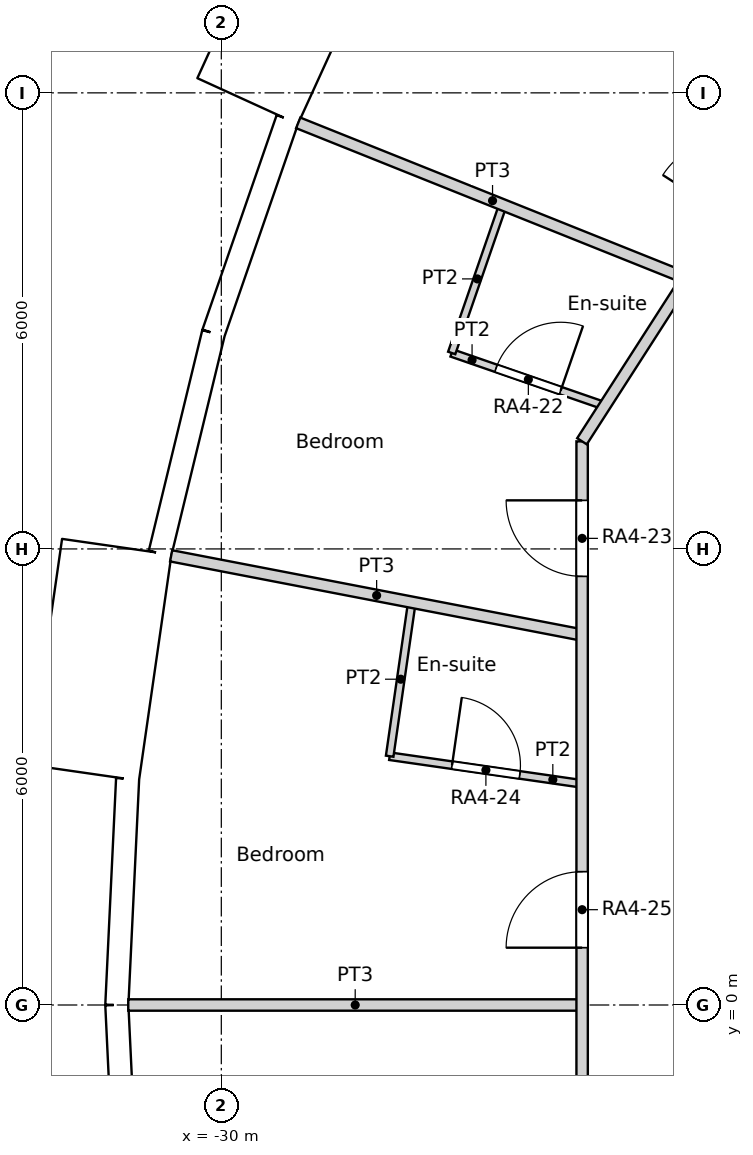
"""IFC4 building model, lengths in metres.
Left out: names, types, materials, properties, quantities, classifications, styles, units other than length and angle.
Written with IfcOpenShell. Run it as: python <this file> out.ifc"""

import sys

from ifc_helpers import new_model, si_unit, direction, frame, frame_2d, origin, origin_2d, place, context, subcontext, project, spatial, rectangle, circle, extrude, element, fill, save


model = new_model("IFC4")
c1 = context("Model", 3, precision=1e-05, world=origin(), true_north=direction((0.0, 1.0)))
c2 = subcontext(c1, "Body", "Model", "MODEL_VIEW")
j1 = project(units=[si_unit("LENGTHUNIT", "METRE"), si_unit("PLANEANGLEUNIT", "RADIAN")], contexts=[c1])
p1 = place(None, origin())
s1 = spatial("IfcSite", under=j1, at=p1, CompositionType="ELEMENT")
p2 = place(p1, origin())
s2 = spatial("IfcBuilding", under=s1, at=p2, CompositionType="ELEMENT")
p3 = place(p2, frame((0.0, 0.0, 60.6)))
s3 = spatial("IfcBuildingStorey", under=s2, at=p3, CompositionType="ELEMENT", Elevation=60.6)
for number, where, z_axis, x_axis in (
    (1, (-29.048, 8.529, 0.0), (0.0, 0.0, 1.0), (1.0, 0.0, 0.0)),
    (2, (-30.137, 2.878, 0.0), (0.0, 0.0, 1.0), (1.0, 0.0, 0.0)),
):
    element("IfcColumn", number, at=place(p3, frame(where, z_axis=z_axis, x_axis=x_axis)), inside=s3, PredefinedType="COLUMN", context=c2, shape_type="SweptSolid", body=[
        extrude(circle(Radius=0.7, at=origin_2d()), origin(), (0.0, 0.0, 1.0), 3.6),
    ])
p4 = place(p3, frame((-24.382, 2.85, 0.0), z_axis=(0.0, 0.0, 1.0), x_axis=(1.0, 0.0, 0.0)))
e3 = element("IfcColumn", 3, at=p4, inside=s3, PredefinedType="COLUMN", context=c2, shape_type="SweptSolid", body=[
    extrude(circle(Radius=0.75, at=origin_2d()), origin(), (0.0, 0.0, 1.0), 3.6),
])
p5 = place(p3, frame((-28.407, 14.622, -0.45), z_axis=(0.0, 0.0, 1.0), x_axis=(-0.415427028395, -0.909626508012, 0.0)))
e4 = element("IfcWall", 4, at=p5, inside=s3, PredefinedType="ELEMENTEDWALL", context=c2, shape_type="SweptSolid", body=[
    extrude(rectangle(XDim=3.0, YDim=1.45, at=frame_2d((1.5, 0.0))), origin(), (0.0, 0.0, 1.0), 3.6),
])
p6 = place(p5, frame((1.5, 0.0, 2.0)))
e5 = element("IfcOpeningElement", 5, at=p6, cuts=e4, PredefinedType="OPENING", context=c2, shape_type="SweptSolid", body=[
    extrude(circle(Radius=0.9, at=origin_2d()), frame((0.0, 0.735, 0.0), z_axis=(0.0, -1.0, 0.0), x_axis=(1.0, 0.0, 0.0)), (0.0, 0.0, 1.0), 1.47),
])
p7 = place(p3, frame((-29.129, 11.655, 0.0), z_axis=(0.0, 0.0, 1.0), x_axis=(-0.327071167136, -0.944999709856, 0.0)))
e6 = element("IfcWall", 6, at=p7, inside=s3, PredefinedType="SOLIDWALL", context=c2, shape_type="SweptSolid", body=[
    extrude(rectangle(XDim=2.98, YDim=0.3, at=frame_2d((1.49, 0.0))), origin(), (0.0, 0.0, 1.0), 2.65),
])
p8 = place(p7, frame((1.49, 0.0, 1.55)))
e7 = element("IfcOpeningElement", 7, at=p8, cuts=e6, PredefinedType="OPENING", context=c2, shape_type="SweptSolid", body=[
    extrude(circle(Radius=0.9, at=origin_2d()), frame((0.0, 0.16, 0.0), z_axis=(0.0, -1.0, 0.0), x_axis=(1.0, 0.0, 0.0)), (0.0, 0.0, 1.0), 0.32),
])
p9 = place(p3, frame((-30.104, 8.839, 0.0), z_axis=(0.0, 0.0, 1.0), x_axis=(-0.235743081534, -0.971815414319, 0.0)))
e8 = element("IfcWall", 8, at=p9, inside=s3, PredefinedType="SOLIDWALL", context=c2, shape_type="SweptSolid", body=[
    extrude(rectangle(XDim=2.979, YDim=0.3, at=frame_2d((1.49, 0.0))), origin(), (0.0, 0.0, 1.0), 3.15),
])
p10 = place(p9, frame((1.49, 0.0, 1.55)))
e9 = element("IfcOpeningElement", 9, at=p10, cuts=e8, PredefinedType="OPENING", context=c2, shape_type="SweptSolid", body=[
    extrude(circle(Radius=0.9, at=origin_2d()), frame((0.0, 0.16, 0.0), z_axis=(0.0, -1.0, 0.0), x_axis=(1.0, 0.0, 0.0)), (0.0, 0.0, 1.0), 0.32),
])
p11 = place(p3, frame((-31.375, 6.027, -0.45), z_axis=(0.0, 0.0, 1.0), x_axis=(-0.142332746704, -0.989818866872, 0.0)))
e10 = element("IfcWall", 10, at=p11, inside=s3, PredefinedType="ELEMENTEDWALL", context=c2, shape_type="SweptSolid", body=[
    extrude(rectangle(XDim=3.0, YDim=1.45, at=frame_2d((1.5, 0.0))), origin(), (0.0, 0.0, 1.0), 3.6),
])
p12 = place(p11, frame((1.5, 0.0, 2.0)))
e11 = element("IfcOpeningElement", 11, at=p12, cuts=e10, PredefinedType="OPENING", context=c2, shape_type="SweptSolid", body=[
    extrude(circle(Radius=0.9, at=origin_2d()), frame((0.0, 0.735, 0.0), z_axis=(0.0, -1.0, 0.0), x_axis=(1.0, 0.0, 0.0)), (0.0, 0.0, 1.0), 1.47),
])
p13 = place(p3, frame((-31.233, 2.976, 0.0), z_axis=(0.0, 0.0, 1.0), x_axis=(-0.047604077644, -0.998866283239, 0.0)))
e12 = element("IfcWall", 12, at=p13, inside=s3, PredefinedType="SOLIDWALL", context=c2, shape_type="SweptSolid", body=[
    extrude(rectangle(XDim=2.98, YDim=0.3, at=frame_2d((1.49, 0.0))), origin(), (0.0, 0.0, 1.0), 2.65),
])
p14 = place(p13, frame((1.49, 0.0, 1.55)))
e13 = element("IfcOpeningElement", 13, at=p14, cuts=e12, PredefinedType="OPENING", context=c2, shape_type="SweptSolid", body=[
    extrude(circle(Radius=0.9, at=origin_2d()), frame((0.0, 0.16, 0.0), z_axis=(0.0, -1.0, 0.0), x_axis=(1.0, 0.0, 0.0)), (0.0, 0.0, 1.0), 0.32),
])
p15 = place(p3, frame((-31.375, 0.0, 0.0), z_axis=(0.0, 0.0, 1.0), x_axis=(0.047604077644, -0.998866283239, 0.0)))
e14 = element("IfcWall", 14, at=p15, inside=s3, PredefinedType="SOLIDWALL", context=c2, shape_type="SweptSolid", body=[
    extrude(rectangle(XDim=2.98, YDim=0.3, at=frame_2d((1.49, 0.0))), origin(), (0.0, 0.0, 1.0), 3.15),
])
p16 = place(p15, frame((1.49, 0.0, 1.55)))
e15 = element("IfcOpeningElement", 15, at=p16, cuts=e14, PredefinedType="OPENING", context=c2, shape_type="SweptSolid", body=[
    extrude(circle(Radius=0.9, at=origin_2d()), frame((0.0, 0.16, 0.0), z_axis=(0.0, -1.0, 0.0), x_axis=(1.0, 0.0, 0.0)), (0.0, 0.0, 1.0), 0.32),
])
p17 = place(p3, frame((-25.255, 7.416, 0.0), z_axis=(0.0, 0.0, 1.0), x_axis=(0.540805851332, 0.841147449123, 0.0)))
e16 = element("IfcWall", 16, at=p17, inside=s3, PredefinedType="PARTITIONING", context=c2, shape_type="SweptSolid", body=[
    extrude(rectangle(XDim=14.829, YDim=0.15, at=frame_2d((7.415, 0.0))), origin(), (0.0, 0.0, 1.0), 3.15),
])
p18 = place(p17, frame((10.307, 0.0, 0.0)))
e17 = element("IfcOpeningElement", 17, at=p18, cuts=e16, PredefinedType="OPENING", context=c2, shape_type="SweptSolid", body=[
    extrude(rectangle(XDim=1.0, YDim=2.1, at=frame_2d((0.5, 1.05))), frame((0.0, 0.075, 0.0), z_axis=(0.0, -1.0, 0.0), x_axis=(1.0, 0.0, 0.0)), (0.0, 0.0, 1.0), 0.15),
])
p19 = place(p17, frame((3.522, 0.0, 0.0)))
e18 = element("IfcOpeningElement", 18, at=p19, cuts=e16, PredefinedType="OPENING", context=c2, shape_type="SweptSolid", body=[
    extrude(rectangle(XDim=1.0, YDim=2.1, at=frame_2d((0.5, 1.05))), frame((0.0, 0.075, 0.0), z_axis=(0.0, -1.0, 0.0), x_axis=(1.0, 0.0, 0.0)), (0.0, 0.0, 1.0), 0.15),
])
p20 = place(p3, frame((-25.253, -7.415, 0.0), z_axis=(0.0, 0.0, 1.0), x_axis=(0.0, 1.0, 0.0)))
e19 = element("IfcWall", 19, at=p20, inside=s3, PredefinedType="PARTITIONING", context=c2, shape_type="SweptSolid", body=[
    extrude(rectangle(XDim=14.83, YDim=0.15, at=frame_2d((7.415, 0.0))), origin(), (0.0, 0.0, 1.0), 3.15),
])
p21 = place(p20, frame((13.054, 0.0, 0.0)))
e20 = element("IfcOpeningElement", 20, at=p21, cuts=e19, PredefinedType="OPENING", context=c2, shape_type="SweptSolid", body=[
    extrude(rectangle(XDim=1.0, YDim=2.1, at=frame_2d((0.5, 1.05))), frame((0.0, 0.075, 0.0), z_axis=(0.0, -1.0, 0.0), x_axis=(1.0, 0.0, 0.0)), (0.0, 0.0, 1.0), 0.15),
])
p22 = place(p20, frame((8.169, 0.0, 0.0)))
e21 = element("IfcOpeningElement", 21, at=p22, cuts=e19, PredefinedType="OPENING", context=c2, shape_type="SweptSolid", body=[
    extrude(rectangle(XDim=1.0, YDim=2.1, at=frame_2d((0.5, 1.05))), frame((0.0, 0.075, 0.0), z_axis=(0.0, -1.0, 0.0), x_axis=(1.0, 0.0, 0.0)), (0.0, 0.0, 1.0), 0.15),
])
p23 = place(p20, frame((2.459, 0.0, 0.0)))
e22 = element("IfcOpeningElement", 22, at=p23, cuts=e19, PredefinedType="OPENING", context=c2, shape_type="SweptSolid", body=[
    extrude(rectangle(XDim=1.0, YDim=2.04, at=frame_2d((0.5, 1.02))), frame((0.0, 0.075, 0.0), z_axis=(0.0, -1.0, 0.0), x_axis=(1.0, 0.0, 0.0)), (0.0, 0.0, 1.0), 0.15),
])
p24 = place(p3, frame((-24.314, 13.213, 0.0), z_axis=(0.0, 0.0, 1.0), x_axis=(0.866007195875, -0.500031535699, 0.0)))
e23 = element("IfcWall", 23, at=p24, inside=s3, PredefinedType="PARTITIONING", context=c2, shape_type="SweptSolid", body=[
    extrude(rectangle(XDim=2.347, YDim=0.1, at=frame_2d((1.174, 0.0))), origin(), (0.0, 0.0, 1.0), 3.15),
])
p25 = place(p24, frame((0.724, 0.0, 0.0)))
e24 = element("IfcOpeningElement", 24, at=p25, cuts=e23, PredefinedType="OPENING", context=c2, shape_type="SweptSolid", body=[
    extrude(rectangle(XDim=0.9, YDim=2.04, at=frame_2d((0.45, 1.02))), frame((0.0, 0.05, 0.0), z_axis=(0.0, -1.0, 0.0), x_axis=(1.0, 0.0, 0.0)), (0.0, 0.0, 1.0), 0.1),
])
p26 = place(p3, frame((-28.988, 11.605, 0.0), z_axis=(0.0, 0.0, 1.0), x_axis=(0.928335994683, -0.371742223828, 0.0)))
e25 = element("IfcWall", 25, at=p26, inside=s3, PredefinedType="PARTITIONING", context=c2, shape_type="SweptSolid", body=[
    extrude(rectangle(XDim=5.508, YDim=0.15, at=frame_2d((2.754, 0.0))), origin(), (0.0, 0.0, 1.0), 3.15),
])
p27 = place(p3, frame((-26.969, 8.578, 0.0), z_axis=(0.0, 0.0, 1.0), x_axis=(0.326825955114, 0.945084543871, 0.0)))
e26 = element("IfcWall", 26, at=p27, inside=s3, PredefinedType="PARTITIONING", context=c2, shape_type="SweptSolid", body=[
    extrude(rectangle(XDim=2.062, YDim=0.1, at=frame_2d((1.031, 0.0))), origin(), (0.0, 0.0, 1.0), 3.15),
])
p28 = place(p3, frame((-26.969, 8.578, 0.0), z_axis=(0.0, 0.0, 1.0), x_axis=(0.945146525342, -0.326646667877, 0.0)))
e27 = element("IfcWall", 27, at=p28, inside=s3, PredefinedType="PARTITIONING", context=c2, shape_type="SweptSolid", body=[
    extrude(rectangle(XDim=2.133, YDim=0.1, at=frame_2d((1.066, 0.0))), origin(), (0.0, 0.0, 1.0), 3.15),
])
p29 = place(p28, frame((0.617, 0.0, 0.0)))
e28 = element("IfcOpeningElement", 28, at=p29, cuts=e27, PredefinedType="OPENING", context=c2, shape_type="SweptSolid", body=[
    extrude(rectangle(XDim=0.9, YDim=2.04, at=frame_2d((0.45, 1.02))), frame((0.0, 0.05, 0.0), z_axis=(0.0, -1.0, 0.0), x_axis=(1.0, 0.0, 0.0)), (0.0, 0.0, 1.0), 0.1),
])
p30 = place(p3, frame((-30.66, 5.909, 0.0), z_axis=(0.0, 0.0, 1.0), x_axis=(0.981940925451, -0.189187787461, 0.0)))
e29 = element("IfcWall", 29, at=p30, inside=s3, PredefinedType="PARTITIONING", context=c2, shape_type="SweptSolid", body=[
    extrude(rectangle(XDim=5.506, YDim=0.15, at=frame_2d((2.753, 0.0))), origin(), (0.0, 0.0, 1.0), 3.15),
])
p31 = place(p3, frame((-27.785, 3.273, 0.0), z_axis=(0.0, 0.0, 1.0), x_axis=(0.142640130423, 0.989774617372, 0.0)))
e30 = element("IfcWall", 30, at=p31, inside=s3, PredefinedType="PARTITIONING", context=c2, shape_type="SweptSolid", body=[
    extrude(rectangle(XDim=2.047, YDim=0.1, at=frame_2d((1.023, 0.0))), origin(), (0.0, 0.0, 1.0), 3.15),
])
p32 = place(p3, frame((-27.785, 3.273, 0.0), z_axis=(0.0, 0.0, 1.0), x_axis=(0.989823118164, -0.142303178978, 0.0)))
e31 = element("IfcWall", 31, at=p32, inside=s3, PredefinedType="PARTITIONING", context=c2, shape_type="SweptSolid", body=[
    extrude(rectangle(XDim=2.558, YDim=0.1, at=frame_2d((1.279, 0.0))), origin(), (0.0, 0.0, 1.0), 3.15),
])
p33 = place(p32, frame((0.829, 0.0, 0.0)))
e32 = element("IfcOpeningElement", 32, at=p33, cuts=e31, PredefinedType="OPENING", context=c2, shape_type="SweptSolid", body=[
    extrude(rectangle(XDim=0.9, YDim=2.04, at=frame_2d((0.45, 1.02))), frame((0.0, 0.05, 0.0), z_axis=(0.0, -1.0, 0.0), x_axis=(1.0, 0.0, 0.0)), (0.0, 0.0, 1.0), 0.1),
])
p34 = place(p3, frame((-31.224, 0.0, 0.0), z_axis=(0.0, 0.0, 1.0), x_axis=(1.0, 0.0, 0.0)))
e33 = element("IfcWall", 33, at=p34, inside=s3, PredefinedType="PARTITIONING", context=c2, shape_type="SweptSolid", body=[
    extrude(rectangle(XDim=5.971, YDim=0.15, at=frame_2d((2.986, 0.0))), origin(), (0.0, 0.0, 1.0), 3.15),
])
p35 = place(p6, origin())
e34 = element("IfcWindow", 34, at=p35, inside=s3, PartitioningType="SINGLE_PANEL", PredefinedType="WINDOW", context=c2, shape_type="SweptSolid", body=[
    extrude(circle(Radius=0.9, at=origin_2d()), frame((0.0, 0.695, 0.0), z_axis=(0.0, -1.0, 0.0), x_axis=(1.0, 0.0, 0.0)), (0.0, 0.0, 1.0), 0.1),
])
fill(e5, e34)
p36 = place(p8, origin())
e35 = element("IfcWindow", 35, at=p36, inside=s3, PartitioningType="SINGLE_PANEL", PredefinedType="WINDOW", context=c2, shape_type="SweptSolid", body=[
    extrude(circle(Radius=0.9, at=origin_2d()), frame((0.0, 0.12, 0.0), z_axis=(0.0, -1.0, 0.0), x_axis=(1.0, 0.0, 0.0)), (0.0, 0.0, 1.0), 0.1),
])
fill(e7, e35)
p37 = place(p10, origin())
e36 = element("IfcWindow", 36, at=p37, inside=s3, PartitioningType="SINGLE_PANEL", PredefinedType="WINDOW", context=c2, shape_type="SweptSolid", body=[
    extrude(circle(Radius=0.9, at=origin_2d()), frame((0.0, 0.12, 0.0), z_axis=(0.0, -1.0, 0.0), x_axis=(1.0, 0.0, 0.0)), (0.0, 0.0, 1.0), 0.1),
])
fill(e9, e36)
p38 = place(p12, origin())
e37 = element("IfcWindow", 37, at=p38, inside=s3, PartitioningType="SINGLE_PANEL", PredefinedType="WINDOW", context=c2, shape_type="SweptSolid", body=[
    extrude(circle(Radius=0.9, at=origin_2d()), frame((0.0, 0.695, 0.0), z_axis=(0.0, -1.0, 0.0), x_axis=(1.0, 0.0, 0.0)), (0.0, 0.0, 1.0), 0.1),
])
fill(e11, e37)
p39 = place(p14, origin())
e38 = element("IfcWindow", 38, at=p39, inside=s3, PartitioningType="SINGLE_PANEL", PredefinedType="WINDOW", context=c2, shape_type="SweptSolid", body=[
    extrude(circle(Radius=0.9, at=origin_2d()), frame((0.0, 0.12, 0.0), z_axis=(0.0, -1.0, 0.0), x_axis=(1.0, 0.0, 0.0)), (0.0, 0.0, 1.0), 0.1),
])
fill(e13, e38)
p40 = place(p16, origin())
e39 = element("IfcWindow", 39, at=p40, inside=s3, PartitioningType="SINGLE_PANEL", PredefinedType="WINDOW", context=c2, shape_type="SweptSolid", body=[
    extrude(circle(Radius=0.9, at=origin_2d()), frame((0.0, 0.12, 0.0), z_axis=(0.0, -1.0, 0.0), x_axis=(1.0, 0.0, 0.0)), (0.0, 0.0, 1.0), 0.1),
])
fill(e15, e39)
p41 = place(p29, origin())
e40 = element("IfcDoor", 40, at=p41, inside=s3, OperationType="SINGLE_SWING_RIGHT", PredefinedType="DOOR", context=c2, shape_type="SweptSolid", body=[
    extrude(rectangle(XDim=0.9, YDim=2.04, at=frame_2d((0.45, 1.02))), frame((0.0, 0.025, 0.0), z_axis=(0.0, -1.0, 0.0), x_axis=(1.0, 0.0, 0.0)), (0.0, 0.0, 1.0), 0.05),
])
fill(e28, e40)
p42 = place(p21, origin())
e41 = element("IfcDoor", 41, at=p42, inside=s3, OperationType="SINGLE_SWING_RIGHT", PredefinedType="DOOR", context=c2, shape_type="SweptSolid", body=[
    extrude(rectangle(XDim=1.0, YDim=2.1, at=frame_2d((0.5, 1.05))), frame((0.0, 0.025, 0.0), z_axis=(0.0, -1.0, 0.0), x_axis=(1.0, 0.0, 0.0)), (0.0, 0.0, 1.0), 0.05),
])
fill(e20, e41)
p43 = place(p33, origin())
e42 = element("IfcDoor", 42, at=p43, inside=s3, OperationType="SINGLE_SWING_LEFT", PredefinedType="DOOR", context=c2, shape_type="SweptSolid", body=[
    extrude(rectangle(XDim=0.9, YDim=2.04, at=frame_2d((0.45, 1.02))), frame((0.0, 0.025, 0.0), z_axis=(0.0, -1.0, 0.0), x_axis=(1.0, 0.0, 0.0)), (0.0, 0.0, 1.0), 0.05),
])
fill(e32, e42)
p44 = place(p22, origin())
e43 = element("IfcDoor", 43, at=p44, inside=s3, OperationType="SINGLE_SWING_LEFT", PredefinedType="DOOR", context=c2, shape_type="SweptSolid", body=[
    extrude(rectangle(XDim=1.0, YDim=2.1, at=frame_2d((0.5, 1.05))), frame((0.0, 0.025, 0.0), z_axis=(0.0, -1.0, 0.0), x_axis=(1.0, 0.0, 0.0)), (0.0, 0.0, 1.0), 0.05),
])
fill(e21, e43)
save(model, sys.argv[1])
